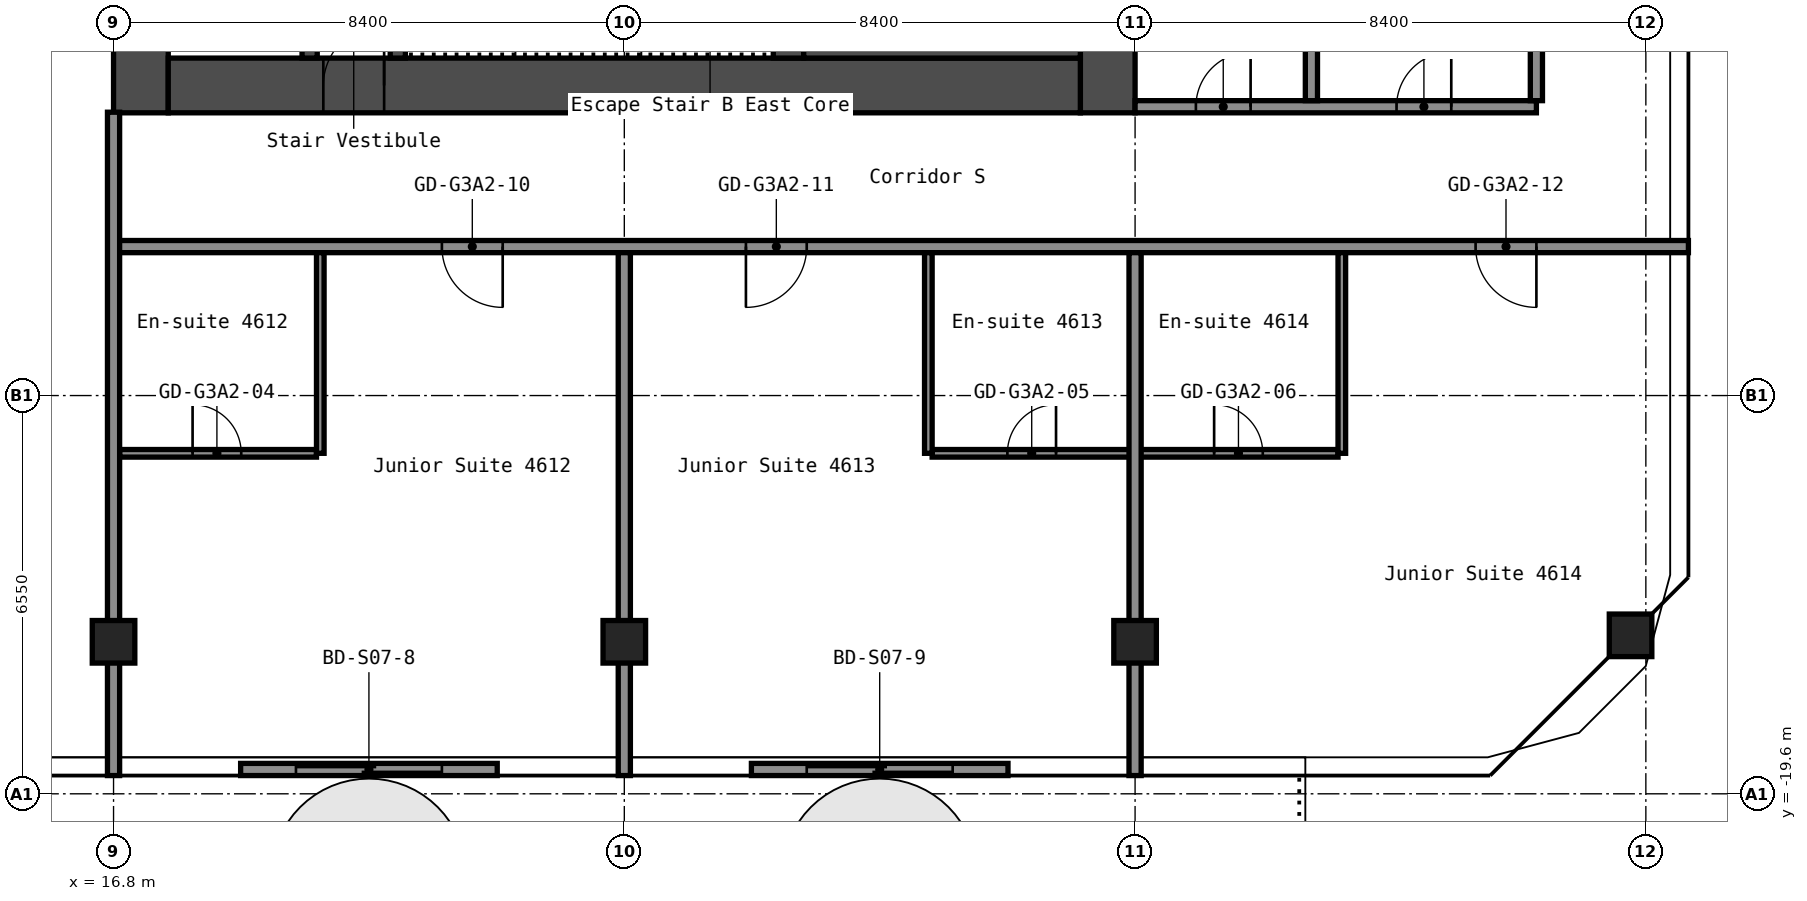
"""IFC4 building model, lengths in metres.
Left out: names, types, materials, properties, quantities, classifications, styles, units other than length and angle.
Written with IfcOpenShell. Run it as: python <this file> out.ifc"""

import sys

from ifc_helpers import new_model, si_unit, direction, frame, frame_2d, origin, origin_2d, place, context, subcontext, project, spatial, rectangle, hollow_rectangle, extrude, element, fill, save


model = new_model("IFC4")
c1 = context("Model", 3, precision=1e-05, world=origin(), true_north=direction((0.0, 1.0)))
c2 = subcontext(c1, "Body", "Model", "MODEL_VIEW")
j1 = project(units=[si_unit("LENGTHUNIT", "METRE"), si_unit("PLANEANGLEUNIT", "RADIAN")], contexts=[c1])
p1 = place(None, origin())
s1 = spatial("IfcSite", under=j1, at=p1, CompositionType="ELEMENT")
p2 = place(p1, origin())
s2 = spatial("IfcBuilding", under=s1, at=p2, CompositionType="ELEMENT")
p3 = place(p2, frame((0.0, 0.0, 163.0)))
s3 = spatial("IfcBuildingStorey", under=s2, at=p3, CompositionType="ELEMENT", Elevation=163.0)
for number, where, z_axis, x_axis in (
    (1, (16.8, -17.1, 0.0), (0.0, 0.0, 1.0), (1.0, 0.0, 0.0)),
    (2, (25.2, -17.1, 0.0), (0.0, 0.0, 1.0), (1.0, 0.0, 0.0)),
    (3, (33.6, -17.1, 0.0), (0.0, 0.0, 1.0), (1.0, 0.0, 0.0)),
    (4, (41.749, -16.994, 0.0), (0.0, 0.0, 1.0), (1.0, 0.0, 0.0)),
):
    element("IfcColumn", number, at=place(p3, frame(where, z_axis=z_axis, x_axis=x_axis)), inside=s3, PredefinedType="COLUMN", context=c2, shape_type="SweptSolid", body=[
        extrude(hollow_rectangle(XDim=0.7, YDim=0.7, WallThickness=0.028, at=origin_2d()), origin(), (0.0, 0.0, 1.0), 2.75),
    ])
p4 = place(p3, frame((17.25, -8.4, 0.0), z_axis=(0.0, 0.0, 1.0), x_axis=(0.0, 1.0, 0.0)))
e5 = element("IfcWall", 5, at=p4, inside=s3, PredefinedType="SHEAR", context=c2, shape_type="SweptSolid", body=[
    extrude(rectangle(XDim=16.8, YDim=0.9, at=frame_2d((8.4, 0.0))), origin(), (0.0, 0.0, 1.0), 2.75),
])
p5 = place(p4, frame((7.1, 0.0, 0.0)))
e6 = element("IfcOpeningElement", 6, at=p5, cuts=e5, PredefinedType="OPENING", context=c2, shape_type="SweptSolid", body=[
    extrude(rectangle(XDim=1.6, YDim=2.1, at=frame_2d((0.8, 1.05))), frame((0.0, 0.46, 0.0), z_axis=(0.0, -1.0, 0.0), x_axis=(1.0, 0.0, 0.0)), (0.0, 0.0, 1.0), 0.92),
])
p6 = place(p3, frame((33.15, -8.4, 0.0), z_axis=(0.0, 0.0, 1.0), x_axis=(0.0, 1.0, 0.0)))
e7 = element("IfcWall", 7, at=p6, inside=s3, PredefinedType="SHEAR", context=c2, shape_type="SweptSolid", body=[
    extrude(rectangle(XDim=16.8, YDim=0.9, at=frame_2d((8.4, 0.0))), origin(), (0.0, 0.0, 1.0), 2.75),
])
p7 = place(p3, frame((17.7, -7.95, 0.0), z_axis=(0.0, 0.0, 1.0), x_axis=(1.0, 0.0, 0.0)))
e8 = element("IfcWall", 8, at=p7, inside=s3, PredefinedType="SHEAR", context=c2, shape_type="SweptSolid", body=[
    extrude(rectangle(XDim=15.0, YDim=0.9, at=frame_2d((7.5, 0.0))), origin(), (0.0, 0.0, 1.0), 2.75),
])
p8 = place(p7, frame((2.55, 0.0, 0.0)))
e9 = element("IfcOpeningElement", 9, at=p8, cuts=e8, PredefinedType="OPENING", context=c2, shape_type="SweptSolid", body=[
    extrude(rectangle(XDim=1.0, YDim=2.1, at=frame_2d((0.5, 1.05))), frame((0.0, 0.46, 0.0), z_axis=(0.0, -1.0, 0.0), x_axis=(1.0, 0.0, 0.0)), (0.0, 0.0, 1.0), 0.92),
])
p9 = place(p3, frame((20.025, -7.5, 0.0), z_axis=(0.0, 0.0, 1.0), x_axis=(0.0, 1.0, 0.0)))
e10 = element("IfcWall", 10, at=p9, inside=s3, PredefinedType="SHEAR", context=c2, shape_type="SweptSolid", body=[
    extrude(rectangle(XDim=6.3, YDim=0.25, at=frame_2d((3.15, 0.0))), origin(), (0.0, 0.0, 1.0), 2.75),
])
p10 = place(p9, frame((2.4, 0.0, 0.0)))
e11 = element("IfcOpeningElement", 11, at=p10, cuts=e10, PredefinedType="OPENING", context=c2, shape_type="SweptSolid", body=[
    extrude(rectangle(XDim=1.0, YDim=2.1, at=frame_2d((0.5, 1.05))), frame((0.0, 0.135, 0.0), z_axis=(0.0, -1.0, 0.0), x_axis=(1.0, 0.0, 0.0)), (0.0, 0.0, 1.0), 0.27),
])
p11 = place(p3, frame((21.475, -7.5, 0.0), z_axis=(0.0, 0.0, 1.0), x_axis=(0.0, 1.0, 0.0)))
e12 = element("IfcWall", 12, at=p11, inside=s3, PredefinedType="SHEAR", context=c2, shape_type="SweptSolid", body=[
    extrude(rectangle(XDim=3.75, YDim=0.25, at=frame_2d((1.875, 0.0))), origin(), (0.0, 0.0, 1.0), 2.75),
])
p12 = place(p11, frame((1.3, 0.0, 0.0)))
e13 = element("IfcOpeningElement", 13, at=p12, cuts=e12, PredefinedType="OPENING", context=c2, shape_type="SweptSolid", body=[
    extrude(rectangle(XDim=1.2, YDim=2.1, at=frame_2d((0.6, 1.05))), frame((0.0, 0.135, 0.0), z_axis=(0.0, -1.0, 0.0), x_axis=(1.0, 0.0, 0.0)), (0.0, 0.0, 1.0), 0.27),
])
p13 = place(p3, frame((27.9, -7.5, 0.0), z_axis=(0.0, 0.0, 1.0), x_axis=(0.0, 1.0, 0.0)))
e14 = element("IfcWall", 14, at=p13, inside=s3, PredefinedType="SHEAR", context=c2, shape_type="SweptSolid", body=[
    extrude(rectangle(XDim=3.75, YDim=0.5, at=frame_2d((1.875, 0.0))), origin(), (0.0, 0.0, 1.0), 2.75),
])
p14 = place(p3, frame((28.15, -6.75, 0.0), z_axis=(0.0, 0.0, 1.0), x_axis=(1.0, 0.0, 0.0)))
e15 = element("IfcWall", 15, at=p14, inside=s3, PredefinedType="SHEAR", context=c2, shape_type="SweptSolid", body=[
    extrude(rectangle(XDim=4.55, YDim=1.5, at=frame_2d((2.275, 0.0))), origin(), (0.0, 0.0, 1.0), 2.75),
])
p15 = place(p3, frame((16.9, -14.0, 0.0), z_axis=(0.0, 0.0, 1.0), x_axis=(1.0, 0.0, 0.0)))
e16 = element("IfcWall", 16, at=p15, inside=s3, PredefinedType="PARTITIONING", context=c2, shape_type="SweptSolid", body=[
    extrude(rectangle(XDim=3.238, YDim=0.125, at=frame_2d((1.619, 0.0))), origin(), (0.0, 0.0, 1.0), 2.75),
])
p16 = place(p15, frame((1.2, 0.0, 0.0)))
e17 = element("IfcOpeningElement", 17, at=p16, cuts=e16, PredefinedType="OPENING", context=c2, shape_type="SweptSolid", body=[
    extrude(rectangle(XDim=0.8, YDim=2.1, at=frame_2d((0.4, 1.05))), frame((0.0, 0.073, 0.0), z_axis=(0.0, -1.0, 0.0), x_axis=(1.0, 0.0, 0.0)), (0.0, 0.0, 1.0), 0.145),
])
p17 = place(p3, frame((30.262, -14.0, 0.0), z_axis=(0.0, 0.0, 1.0), x_axis=(1.0, 0.0, 0.0)))
e18 = element("IfcWall", 18, at=p17, inside=s3, PredefinedType="PARTITIONING", context=c2, shape_type="SweptSolid", body=[
    extrude(rectangle(XDim=6.675, YDim=0.125, at=frame_2d((3.337, 0.0))), origin(), (0.0, 0.0, 1.0), 2.75),
])
p18 = place(p17, frame((1.238, 0.0, 0.0)))
e19 = element("IfcOpeningElement", 19, at=p18, cuts=e18, PredefinedType="OPENING", context=c2, shape_type="SweptSolid", body=[
    extrude(rectangle(XDim=0.8, YDim=2.1, at=frame_2d((0.4, 1.05))), frame((0.0, 0.073, 0.0), z_axis=(0.0, -1.0, 0.0), x_axis=(1.0, 0.0, 0.0)), (0.0, 0.0, 1.0), 0.145),
])
p19 = place(p17, frame((4.637, 0.0, 0.0)))
e20 = element("IfcOpeningElement", 20, at=p19, cuts=e18, PredefinedType="OPENING", context=c2, shape_type="SweptSolid", body=[
    extrude(rectangle(XDim=0.8, YDim=2.1, at=frame_2d((0.4, 1.05))), frame((0.0, 0.073, 0.0), z_axis=(0.0, -1.0, 0.0), x_axis=(1.0, 0.0, 0.0)), (0.0, 0.0, 1.0), 0.145),
])
p20 = place(p3, frame((16.8, -10.6, 0.0), z_axis=(0.0, 0.0, 1.0), x_axis=(1.0, 0.0, 0.0)))
e21 = element("IfcWall", 21, at=p20, inside=s3, PredefinedType="PARTITIONING", context=c2, shape_type="SweptSolid", body=[
    extrude(rectangle(XDim=25.9, YDim=0.2, at=frame_2d((12.95, 0.0))), origin(), (0.0, 0.0, 1.0), 2.75),
])
p21 = place(p20, frame((5.4, 0.0, 0.0)))
e22 = element("IfcOpeningElement", 22, at=p21, cuts=e21, PredefinedType="OPENING", context=c2, shape_type="SweptSolid", body=[
    extrude(rectangle(XDim=1.0, YDim=2.1, at=frame_2d((0.5, 1.05))), frame((0.0, 0.11, 0.0), z_axis=(0.0, -1.0, 0.0), x_axis=(1.0, 0.0, 0.0)), (0.0, 0.0, 1.0), 0.22),
])
p22 = place(p20, frame((10.4, 0.0, 0.0)))
e23 = element("IfcOpeningElement", 23, at=p22, cuts=e21, PredefinedType="OPENING", context=c2, shape_type="SweptSolid", body=[
    extrude(rectangle(XDim=1.0, YDim=2.1, at=frame_2d((0.5, 1.05))), frame((0.0, 0.11, 0.0), z_axis=(0.0, -1.0, 0.0), x_axis=(1.0, 0.0, 0.0)), (0.0, 0.0, 1.0), 0.22),
])
p23 = place(p20, frame((22.4, 0.0, 0.0)))
e24 = element("IfcOpeningElement", 24, at=p23, cuts=e21, PredefinedType="OPENING", context=c2, shape_type="SweptSolid", body=[
    extrude(rectangle(XDim=1.0, YDim=2.1, at=frame_2d((0.5, 1.05))), frame((0.0, 0.11, 0.0), z_axis=(0.0, -1.0, 0.0), x_axis=(1.0, 0.0, 0.0)), (0.0, 0.0, 1.0), 0.22),
])
p24 = place(p3, frame((33.6, -8.3, 0.0), z_axis=(0.0, 0.0, 1.0), x_axis=(1.0, 0.0, 0.0)))
e25 = element("IfcWall", 25, at=p24, inside=s3, PredefinedType="PARTITIONING", context=c2, shape_type="SweptSolid", body=[
    extrude(rectangle(XDim=6.6, YDim=0.2, at=frame_2d((3.3, 0.0))), origin(), (0.0, 0.0, 1.0), 2.75),
])
p25 = place(p24, frame((1.0, 0.0, 0.0)))
e26 = element("IfcOpeningElement", 26, at=p25, cuts=e25, PredefinedType="OPENING", context=c2, shape_type="SweptSolid", body=[
    extrude(rectangle(XDim=0.9, YDim=2.1, at=frame_2d((0.45, 1.05))), frame((0.0, 0.11, 0.0), z_axis=(0.0, -1.0, 0.0), x_axis=(1.0, 0.0, 0.0)), (0.0, 0.0, 1.0), 0.22),
])
p26 = place(p24, frame((4.3, 0.0, 0.0)))
e27 = element("IfcOpeningElement", 27, at=p26, cuts=e25, PredefinedType="OPENING", context=c2, shape_type="SweptSolid", body=[
    extrude(rectangle(XDim=0.9, YDim=2.1, at=frame_2d((0.45, 1.05))), frame((0.0, 0.11, 0.0), z_axis=(0.0, -1.0, 0.0), x_axis=(1.0, 0.0, 0.0)), (0.0, 0.0, 1.0), 0.22),
])
p27 = place(p3, frame((16.8, -19.3, 0.0), z_axis=(0.0, 0.0, 1.0), x_axis=(0.0, 1.0, 0.0)))
e28 = element("IfcWall", 28, at=p27, inside=s3, PredefinedType="PARTITIONING", context=c2, shape_type="SweptSolid", body=[
    extrude(rectangle(XDim=10.91, YDim=0.2, at=frame_2d((5.455, 0.0))), origin(), (0.0, 0.0, 1.0), 2.75),
])
p28 = place(p3, frame((20.2, -14.0, 0.0), z_axis=(0.0, 0.0, 1.0), x_axis=(0.0, 1.0, 0.0)))
e29 = element("IfcWall", 29, at=p28, inside=s3, PredefinedType="PARTITIONING", context=c2, shape_type="SweptSolid", body=[
    extrude(rectangle(XDim=3.3, YDim=0.125, at=frame_2d((1.65, 0.0))), origin(), (0.0, 0.0, 1.0), 2.75),
])
p29 = place(p3, frame((25.2, -19.3, 0.0), z_axis=(0.0, 0.0, 1.0), x_axis=(0.0, 1.0, 0.0)))
e30 = element("IfcWall", 30, at=p29, inside=s3, PredefinedType="PARTITIONING", context=c2, shape_type="SweptSolid", body=[
    extrude(rectangle(XDim=8.6, YDim=0.2, at=frame_2d((4.3, 0.0))), origin(), (0.0, 0.0, 1.0), 2.75),
])
p30 = place(p3, frame((30.2, -14.0, 0.0), z_axis=(0.0, 0.0, 1.0), x_axis=(0.0, 1.0, 0.0)))
e31 = element("IfcWall", 31, at=p30, inside=s3, PredefinedType="PARTITIONING", context=c2, shape_type="SweptSolid", body=[
    extrude(rectangle(XDim=3.3, YDim=0.125, at=frame_2d((1.65, 0.0))), origin(), (0.0, 0.0, 1.0), 2.75),
])
p31 = place(p3, frame((33.6, -19.3, 0.0), z_axis=(0.0, 0.0, 1.0), x_axis=(0.0, 1.0, 0.0)))
e32 = element("IfcWall", 32, at=p31, inside=s3, PredefinedType="PARTITIONING", context=c2, shape_type="SweptSolid", body=[
    extrude(rectangle(XDim=8.6, YDim=0.2, at=frame_2d((4.3, 0.0))), origin(), (0.0, 0.0, 1.0), 2.75),
])
p32 = place(p3, frame((36.5, -8.2, 0.0), z_axis=(0.0, 0.0, 1.0), x_axis=(0.0, 1.0, 0.0)))
e33 = element("IfcWall", 33, at=p32, inside=s3, PredefinedType="PARTITIONING", context=c2, shape_type="SweptSolid", body=[
    extrude(rectangle(XDim=8.2, YDim=0.2, at=frame_2d((4.1, 0.0))), origin(), (0.0, 0.0, 1.0), 2.75),
])
p33 = place(p3, frame((37.0, -14.0, 0.0), z_axis=(0.0, 0.0, 1.0), x_axis=(0.0, 1.0, 0.0)))
e34 = element("IfcWall", 34, at=p33, inside=s3, PredefinedType="PARTITIONING", context=c2, shape_type="SweptSolid", body=[
    extrude(rectangle(XDim=3.3, YDim=0.125, at=frame_2d((1.65, 0.0))), origin(), (0.0, 0.0, 1.0), 2.75),
])
p34 = place(p3, frame((40.2, -8.2, 0.0), z_axis=(0.0, 0.0, 1.0), x_axis=(0.0, 1.0, 0.0)))
e35 = element("IfcWall", 35, at=p34, inside=s3, PredefinedType="PARTITIONING", context=c2, shape_type="SweptSolid", body=[
    extrude(rectangle(XDim=16.4, YDim=0.2, at=frame_2d((8.2, 0.0))), origin(), (0.0, 0.0, 1.0), 2.75),
])
p35 = place(p3, frame((18.89, -19.2, 0.0), z_axis=(0.0, 0.0, 1.0), x_axis=(1.0, 0.0, 0.0)))
p36 = place(p35, frame((0.91, 0.0, 0.0)))
p37 = place(p36, frame((2.4, 0.0, 0.0), z_axis=(0.0, 0.0, 1.0), x_axis=(-1.0, 0.0, 0.0)))
e36 = element("IfcDoor", 36, at=p37, inside=s3, OperationType="SLIDING_TO_LEFT", PredefinedType="DOOR", context=c2, shape_type="SweptSolid", body=[
    extrude(rectangle(XDim=2.4, YDim=2.2, at=frame_2d((1.2, 1.1))), frame((0.0, 0.025, 0.0), z_axis=(0.0, -1.0, 0.0), x_axis=(1.0, 0.0, 0.0)), (0.0, 0.0, 1.0), 0.05),
])
p38 = place(p3, frame((27.29, -19.2, 0.0), z_axis=(0.0, 0.0, 1.0), x_axis=(1.0, 0.0, 0.0)))
p39 = place(p38, frame((0.91, 0.0, 0.0)))
p40 = place(p39, frame((2.4, 0.0, 0.0), z_axis=(0.0, 0.0, 1.0), x_axis=(-1.0, 0.0, 0.0)))
e37 = element("IfcDoor", 37, at=p40, inside=s3, OperationType="SLIDING_TO_LEFT", PredefinedType="DOOR", context=c2, shape_type="SweptSolid", body=[
    extrude(rectangle(XDim=2.4, YDim=2.2, at=frame_2d((1.2, 1.1))), frame((0.0, 0.025, 0.0), z_axis=(0.0, -1.0, 0.0), x_axis=(1.0, 0.0, 0.0)), (0.0, 0.0, 1.0), 0.05),
])
p41 = place(p8, origin())
e38 = element("IfcDoor", 38, at=p41, inside=s3, OperationType="SINGLE_SWING_LEFT", PredefinedType="DOOR", context=c2, shape_type="SweptSolid", body=[
    extrude(rectangle(XDim=1.0, YDim=2.1, at=frame_2d((0.5, 1.05))), frame((0.0, 0.025, 0.0), z_axis=(0.0, -1.0, 0.0), x_axis=(1.0, 0.0, 0.0)), (0.0, 0.0, 1.0), 0.05),
])
fill(e9, e38)
p42 = place(p16, origin())
e39 = element("IfcDoor", 39, at=p42, inside=s3, OperationType="SINGLE_SWING_RIGHT", PredefinedType="DOOR", context=c2, shape_type="SweptSolid", body=[
    extrude(rectangle(XDim=0.8, YDim=2.1, at=frame_2d((0.4, 1.05))), frame((0.0, 0.025, 0.0), z_axis=(0.0, -1.0, 0.0), x_axis=(1.0, 0.0, 0.0)), (0.0, 0.0, 1.0), 0.05),
])
fill(e17, e39)
p43 = place(p18, origin())
e40 = element("IfcDoor", 40, at=p43, inside=s3, OperationType="SINGLE_SWING_LEFT", PredefinedType="DOOR", context=c2, shape_type="SweptSolid", body=[
    extrude(rectangle(XDim=0.8, YDim=2.1, at=frame_2d((0.4, 1.05))), frame((0.0, 0.025, 0.0), z_axis=(0.0, -1.0, 0.0), x_axis=(1.0, 0.0, 0.0)), (0.0, 0.0, 1.0), 0.05),
])
fill(e19, e40)
p44 = place(p19, origin())
e41 = element("IfcDoor", 41, at=p44, inside=s3, OperationType="SINGLE_SWING_RIGHT", PredefinedType="DOOR", context=c2, shape_type="SweptSolid", body=[
    extrude(rectangle(XDim=0.8, YDim=2.1, at=frame_2d((0.4, 1.05))), frame((0.0, 0.025, 0.0), z_axis=(0.0, -1.0, 0.0), x_axis=(1.0, 0.0, 0.0)), (0.0, 0.0, 1.0), 0.05),
])
fill(e20, e41)
p45 = place(p21, origin())
e42 = element("IfcDoor", 42, at=p45, inside=s3, OperationType="SINGLE_SWING_RIGHT", PredefinedType="DOOR", context=c2, shape_type="SweptSolid", body=[
    extrude(rectangle(XDim=1.0, YDim=2.1, at=frame_2d((0.5, 1.05))), frame((0.0, 0.025, 0.0), z_axis=(0.0, -1.0, 0.0), x_axis=(1.0, 0.0, 0.0)), (0.0, 0.0, 1.0), 0.05),
])
fill(e22, e42)
p46 = place(p22, origin())
e43 = element("IfcDoor", 43, at=p46, inside=s3, OperationType="SINGLE_SWING_LEFT", PredefinedType="DOOR", context=c2, shape_type="SweptSolid", body=[
    extrude(rectangle(XDim=1.0, YDim=2.1, at=frame_2d((0.5, 1.05))), frame((0.0, 0.025, 0.0), z_axis=(0.0, -1.0, 0.0), x_axis=(1.0, 0.0, 0.0)), (0.0, 0.0, 1.0), 0.05),
])
fill(e23, e43)
p47 = place(p23, origin())
e44 = element("IfcDoor", 44, at=p47, inside=s3, OperationType="SINGLE_SWING_RIGHT", PredefinedType="DOOR", context=c2, shape_type="SweptSolid", body=[
    extrude(rectangle(XDim=1.0, YDim=2.1, at=frame_2d((0.5, 1.05))), frame((0.0, 0.025, 0.0), z_axis=(0.0, -1.0, 0.0), x_axis=(1.0, 0.0, 0.0)), (0.0, 0.0, 1.0), 0.05),
])
fill(e24, e44)
p48 = place(p25, origin())
e45 = element("IfcDoor", 45, at=p48, inside=s3, OperationType="SINGLE_SWING_LEFT", PredefinedType="DOOR", context=c2, shape_type="SweptSolid", body=[
    extrude(rectangle(XDim=0.9, YDim=2.1, at=frame_2d((0.45, 1.05))), frame((0.0, 0.025, 0.0), z_axis=(0.0, -1.0, 0.0), x_axis=(1.0, 0.0, 0.0)), (0.0, 0.0, 1.0), 0.05),
])
fill(e26, e45)
p49 = place(p26, origin())
e46 = element("IfcDoor", 46, at=p49, inside=s3, OperationType="SINGLE_SWING_LEFT", PredefinedType="DOOR", context=c2, shape_type="SweptSolid", body=[
    extrude(rectangle(XDim=0.9, YDim=2.1, at=frame_2d((0.45, 1.05))), frame((0.0, 0.025, 0.0), z_axis=(0.0, -1.0, 0.0), x_axis=(1.0, 0.0, 0.0)), (0.0, 0.0, 1.0), 0.05),
])
fill(e27, e46)
save(model, sys.argv[1])
